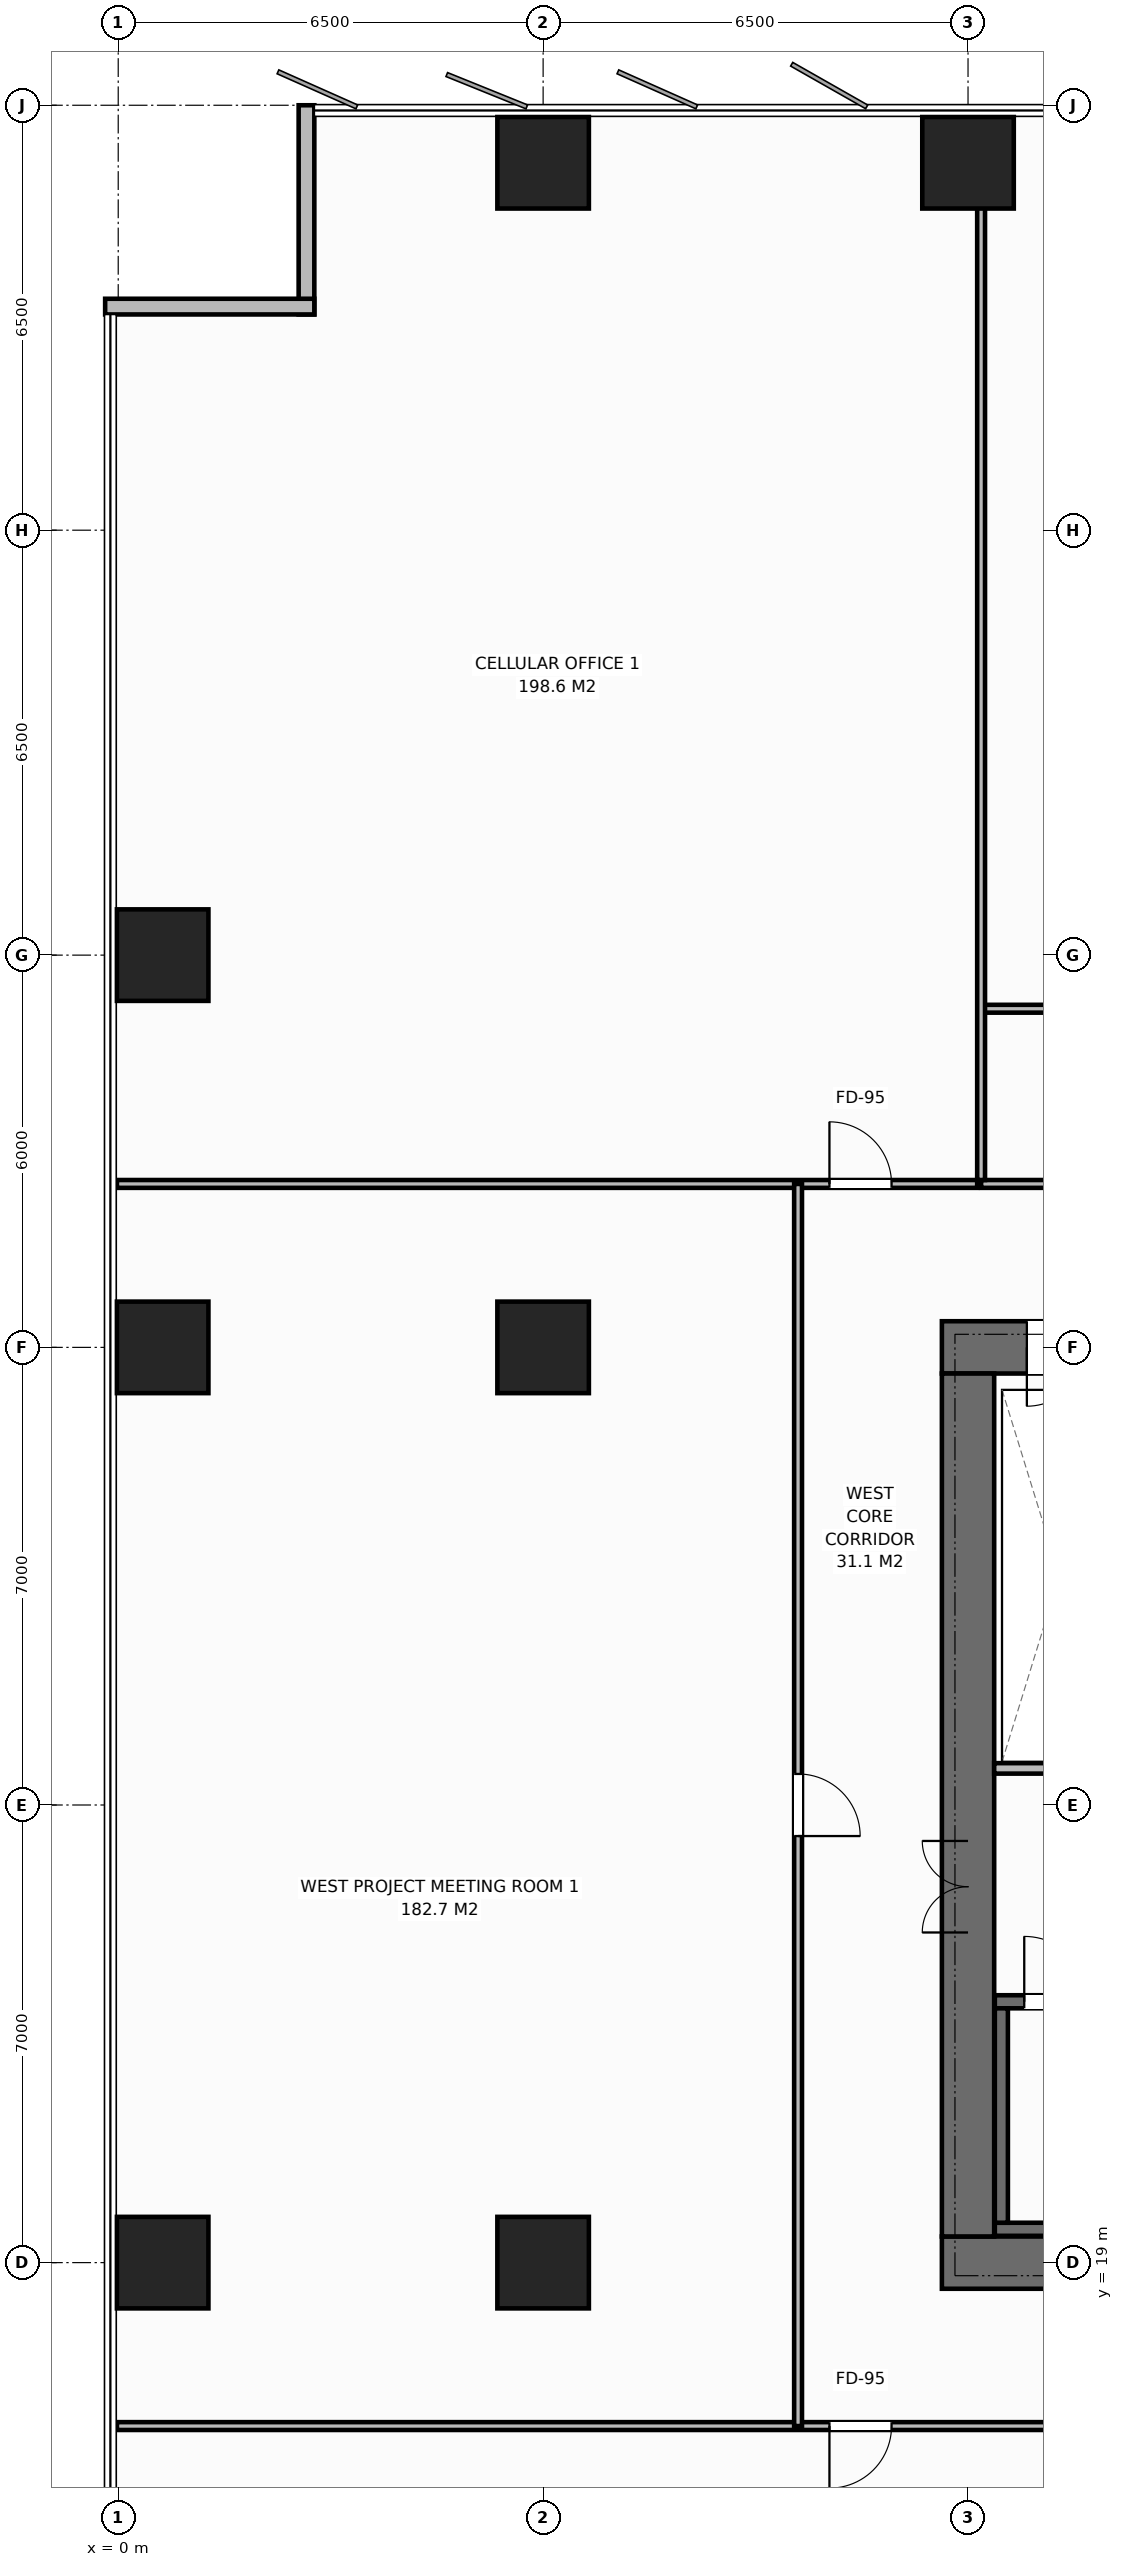
"""IFC4 building model, lengths in metres.
Left out: names, types, materials, properties, quantities, classifications, styles, units other than length and angle.
Written with IfcOpenShell. Run it as: python <this file> out.ifc"""

import sys

from ifc_helpers import new_model, si_unit, direction, frame, frame_2d, origin, origin_2d, place, context, subcontext, project, spatial, rectangle, extrude, element, fill, save


model = new_model("IFC4")
c1 = context("Model", 3, precision=1e-05, world=origin(), true_north=direction((0.0, 1.0)))
c2 = subcontext(c1, "Body", "Model", "MODEL_VIEW")
j1 = project(units=[si_unit("LENGTHUNIT", "METRE"), si_unit("PLANEANGLEUNIT", "RADIAN")], contexts=[c1])
p1 = place(None, origin())
s1 = spatial("IfcSite", under=j1, at=p1, CompositionType="ELEMENT")
p2 = place(p1, origin())
s2 = spatial("IfcBuilding", under=s1, at=p2, CompositionType="ELEMENT")
p3 = place(p2, frame((0.0, 0.0, 27.8)))
s3 = spatial("IfcBuildingStorey", under=s2, at=p3, CompositionType="ELEMENT", Elevation=27.8)
p4 = place(p3, frame((12.6, 19.0, 0.0), z_axis=(0.0, 0.0, 1.0), x_axis=(1.0, 0.0, 0.0)))
e1 = element("IfcWall", 1, at=p4, inside=s3, PredefinedType="SHEAR", context=c2, shape_type="SweptSolid", body=[
    extrude(rectangle(XDim=13.8, YDim=0.8, at=frame_2d((6.9, 0.0))), origin(), (0.0, 0.0, 1.0), 3.8),
])
p5 = place(p4, frame((9.28, 0.0, 0.0)))
e2 = element("IfcOpeningElement", 2, at=p5, cuts=e1, PredefinedType="OPENING", context=c2, shape_type="SweptSolid", body=[
    extrude(rectangle(XDim=1.4, YDim=2.2, at=frame_2d((0.7, 1.1))), frame((0.0, 0.41, 0.0), z_axis=(0.0, -1.0, 0.0), x_axis=(1.0, 0.0, 0.0)), (0.0, 0.0, 1.0), 0.82),
])
p6 = place(p3, frame((12.6, 33.0, 0.0), z_axis=(0.0, 0.0, 1.0), x_axis=(1.0, 0.0, 0.0)))
e3 = element("IfcWall", 3, at=p6, inside=s3, PredefinedType="SHEAR", context=c2, shape_type="SweptSolid", body=[
    extrude(rectangle(XDim=13.8, YDim=0.8, at=frame_2d((6.9, 0.0))), origin(), (0.0, 0.0, 1.0), 3.8),
])
p7 = place(p6, frame((1.3, 0.0, 0.0)))
e4 = element("IfcOpeningElement", 4, at=p7, cuts=e3, PredefinedType="OPENING", context=c2, shape_type="SweptSolid", body=[
    extrude(rectangle(XDim=0.9, YDim=2.15, at=frame_2d((0.45, 1.075))), frame((0.0, 0.41, 0.0), z_axis=(0.0, -1.0, 0.0), x_axis=(1.0, 0.0, 0.0)), (0.0, 0.0, 1.0), 0.82),
])
p8 = place(p6, frame((3.35, 0.0, 0.0)))
e5 = element("IfcOpeningElement", 5, at=p8, cuts=e3, PredefinedType="OPENING", context=c2, shape_type="SweptSolid", body=[
    extrude(rectangle(XDim=0.95, YDim=2.15, at=frame_2d((0.475, 1.075))), frame((0.0, 0.41, 0.0), z_axis=(0.0, -1.0, 0.0), x_axis=(1.0, 0.0, 0.0)), (0.0, 0.0, 1.0), 0.82),
])
p9 = place(p6, frame((6.2, 0.0, 0.0)))
e6 = element("IfcOpeningElement", 6, at=p9, cuts=e3, PredefinedType="OPENING", context=c2, shape_type="SweptSolid", body=[
    extrude(rectangle(XDim=0.95, YDim=2.15, at=frame_2d((0.475, 1.075))), frame((0.0, 0.41, 0.0), z_axis=(0.0, -1.0, 0.0), x_axis=(1.0, 0.0, 0.0)), (0.0, 0.0, 1.0), 0.82),
])
p10 = place(p6, frame((9.28, 0.0, 0.0)))
e7 = element("IfcOpeningElement", 7, at=p10, cuts=e3, PredefinedType="OPENING", context=c2, shape_type="SweptSolid", body=[
    extrude(rectangle(XDim=1.4, YDim=2.2, at=frame_2d((0.7, 1.1))), frame((0.0, 0.41, 0.0), z_axis=(0.0, -1.0, 0.0), x_axis=(1.0, 0.0, 0.0)), (0.0, 0.0, 1.0), 0.82),
])
p11 = place(p3, frame((13.0, 19.4, 0.0), z_axis=(0.0, 0.0, 1.0), x_axis=(0.0, 1.0, 0.0)))
e8 = element("IfcWall", 8, at=p11, inside=s3, PredefinedType="SHEAR", context=c2, shape_type="SweptSolid", body=[
    extrude(rectangle(XDim=13.2, YDim=0.8, at=frame_2d((6.6, 0.0))), origin(), (0.0, 0.0, 1.0), 3.8),
])
p12 = place(p11, frame((4.65, 0.0, 0.0)))
e9 = element("IfcOpeningElement", 9, at=p12, cuts=e8, PredefinedType="OPENING", context=c2, shape_type="SweptSolid", body=[
    extrude(rectangle(XDim=1.4, YDim=2.2, at=frame_2d((0.7, 1.1))), frame((0.0, 0.41, 0.0), z_axis=(0.0, -1.0, 0.0), x_axis=(1.0, 0.0, 0.0)), (0.0, 0.0, 1.0), 0.82),
])
p13 = place(p3, frame((13.41, 19.51, 0.0), z_axis=(0.0, 0.0, 1.0), x_axis=(1.0, 0.0, 0.0)))
e10 = element("IfcWall", 10, at=p13, inside=s3, PredefinedType="SHEAR", context=c2, shape_type="SweptSolid", body=[
    extrude(rectangle(XDim=8.43, YDim=0.2, at=frame_2d((4.215, 0.0))), origin(), (0.0, 0.0, 1.0), 3.8),
])
p14 = place(p3, frame((13.41, 22.99, 0.0), z_axis=(0.0, 0.0, 1.0), x_axis=(1.0, 0.0, 0.0)))
e11 = element("IfcWall", 11, at=p14, inside=s3, PredefinedType="SHEAR", context=c2, shape_type="SweptSolid", body=[
    extrude(rectangle(XDim=8.43, YDim=0.2, at=frame_2d((4.215, 0.0))), origin(), (0.0, 0.0, 1.0), 3.8),
])
p15 = place(p14, frame((0.45, 0.0, 0.0)))
e12 = element("IfcOpeningElement", 12, at=p15, cuts=e11, PredefinedType="OPENING", context=c2, shape_type="SweptSolid", body=[
    extrude(rectangle(XDim=1.0, YDim=2.15, at=frame_2d((0.5, 1.075))), frame((0.0, 0.11, 0.0), z_axis=(0.0, -1.0, 0.0), x_axis=(1.0, 0.0, 0.0)), (0.0, 0.0, 1.0), 0.22),
])
p16 = place(p3, frame((13.51, 19.61, 0.0), z_axis=(0.0, 0.0, 1.0), x_axis=(0.0, 1.0, 0.0)))
e13 = element("IfcWall", 13, at=p16, inside=s3, PredefinedType="SHEAR", context=c2, shape_type="SweptSolid", body=[
    extrude(rectangle(XDim=3.28, YDim=0.2, at=frame_2d((1.64, 0.0))), origin(), (0.0, 0.0, 1.0), 3.8),
])
for number, where, z_axis, x_axis in (
    (14, (6.5, 19.0, 0.0), (0.0, 0.0, 1.0), (1.0, 0.0, 0.0)),
    (15, (6.5, 33.0, 0.0), (0.0, 0.0, 1.0), (1.0, 0.0, 0.0)),
    (16, (6.5, 51.12, 0.0), (0.0, 0.0, 1.0), (1.0, 0.0, 0.0)),
    (17, (13.0, 51.12, 0.0), (0.0, 0.0, 1.0), (1.0, 0.0, 0.0)),
    (18, (0.68, 19.0, 0.0), (0.0, 0.0, 1.0), (1.0, 0.0, 0.0)),
    (19, (0.68, 33.0, 0.0), (0.0, 0.0, 1.0), (1.0, 0.0, 0.0)),
    (20, (0.68, 39.0, 0.0), (0.0, 0.0, 1.0), (1.0, 0.0, 0.0)),
):
    element("IfcColumn", number, at=place(p3, frame(where, z_axis=z_axis, x_axis=x_axis)), inside=s3, PredefinedType="COLUMN", context=c2, shape_type="SweptSolid", body=[
        extrude(rectangle(XDim=1.4, YDim=1.4, at=origin_2d()), origin(), (0.0, 0.0, 1.0), 3.8),
    ])
for number, where, z_axis, x_axis in (
    (21, (2.88, 48.8, 0.0), (0.0, 0.0, 1.0), (0.0, 1.0, 0.0)),
    (22, (-0.2, 48.92, 0.0), (0.0, 0.0, 1.0), (1.0, 0.0, 0.0)),
):
    element("IfcWall", number, at=place(p3, frame(where, z_axis=z_axis, x_axis=x_axis)), inside=s3, PredefinedType="STANDARD", context=c2, shape_type="SweptSolid", body=[
        extrude(rectangle(XDim=3.2, YDim=0.24, at=frame_2d((1.6, 0.0))), origin(), (0.0, 0.0, 1.0), 3.55),
    ])
p17 = place(p3, frame((13.4, 26.56, 0.0), z_axis=(0.0, 0.0, 1.0), x_axis=(1.0, 0.0, 0.0)))
e23 = element("IfcWall", 23, at=p17, inside=s3, PredefinedType="STANDARD", context=c2, shape_type="SweptSolid", body=[
    extrude(rectangle(XDim=8.34, YDim=0.16, at=frame_2d((4.17, 0.0))), origin(), (0.0, 0.0, 1.0), 3.55),
])
p18 = place(p3, frame((13.2, 35.5, 0.0), z_axis=(0.0, 0.0, 1.0), x_axis=(1.0, 0.0, 0.0)))
e24 = element("IfcWall", 24, at=p18, inside=s3, PredefinedType="PARTITIONING", context=c2, shape_type="SweptSolid", body=[
    extrude(rectangle(XDim=13.16, YDim=0.12, at=frame_2d((6.58, 0.0))), origin(), (0.0, 0.0, 1.0), 3.55),
])
p19 = place(p18, frame((1.35, 0.0, 0.0)))
e25 = element("IfcOpeningElement", 25, at=p19, cuts=e24, PredefinedType="OPENING", context=c2, shape_type="SweptSolid", body=[
    extrude(rectangle(XDim=0.9, YDim=2.15, at=frame_2d((0.45, 1.075))), frame((0.0, 0.07, 0.0), z_axis=(0.0, -1.0, 0.0), x_axis=(1.0, 0.0, 0.0)), (0.0, 0.0, 1.0), 0.14),
])
p20 = place(p18, frame((4.05, 0.0, 0.0)))
e26 = element("IfcOpeningElement", 26, at=p20, cuts=e24, PredefinedType="OPENING", context=c2, shape_type="SweptSolid", body=[
    extrude(rectangle(XDim=0.9, YDim=2.15, at=frame_2d((0.45, 1.075))), frame((0.0, 0.07, 0.0), z_axis=(0.0, -1.0, 0.0), x_axis=(1.0, 0.0, 0.0)), (0.0, 0.0, 1.0), 0.14),
])
p21 = place(p18, frame((8.25, 0.0, 0.0)))
e27 = element("IfcOpeningElement", 27, at=p21, cuts=e24, PredefinedType="OPENING", context=c2, shape_type="SweptSolid", body=[
    extrude(rectangle(XDim=0.9, YDim=2.15, at=frame_2d((0.45, 1.075))), frame((0.0, 0.07, 0.0), z_axis=(0.0, -1.0, 0.0), x_axis=(1.0, 0.0, 0.0)), (0.0, 0.0, 1.0), 0.14),
])
p22 = place(p18, frame((11.0, 0.0, 0.0)))
e28 = element("IfcOpeningElement", 28, at=p22, cuts=e24, PredefinedType="OPENING", context=c2, shape_type="SweptSolid", body=[
    extrude(rectangle(XDim=0.95, YDim=2.15, at=frame_2d((0.475, 1.075))), frame((0.0, 0.07, 0.0), z_axis=(0.0, -1.0, 0.0), x_axis=(1.0, 0.0, 0.0)), (0.0, 0.0, 1.0), 0.14),
])
p23 = place(p3, frame((13.2, 38.18, 0.0), z_axis=(0.0, 0.0, 1.0), x_axis=(1.0, 0.0, 0.0)))
e29 = element("IfcWall", 29, at=p23, inside=s3, PredefinedType="PARTITIONING", context=c2, shape_type="SweptSolid", body=[
    extrude(rectangle(XDim=13.16, YDim=0.12, at=frame_2d((6.58, 0.0))), origin(), (0.0, 0.0, 1.0), 3.55),
])
p24 = place(p3, frame((13.2, 35.56, 0.0), z_axis=(0.0, 0.0, 1.0), x_axis=(0.0, 1.0, 0.0)))
e30 = element("IfcWall", 30, at=p24, inside=s3, PredefinedType="PARTITIONING", context=c2, shape_type="SweptSolid", body=[
    extrude(rectangle(XDim=16.42, YDim=0.12, at=frame_2d((8.21, 0.0))), origin(), (0.0, 0.0, 1.0), 2.9),
])
p25 = place(p3, frame((-0.02, 35.5, 0.0), z_axis=(0.0, 0.0, 1.0), x_axis=(1.0, 0.0, 0.0)))
e31 = element("IfcWall", 31, at=p25, inside=s3, PredefinedType="PARTITIONING", context=c2, shape_type="SweptSolid", body=[
    extrude(rectangle(XDim=13.16, YDim=0.12, at=frame_2d((6.58, 0.0))), origin(), (0.0, 0.0, 1.0), 3.55),
])
p26 = place(p25, frame((10.9, 0.0, 0.0)))
e32 = element("IfcOpeningElement", 32, at=p26, cuts=e31, PredefinedType="OPENING", context=c2, shape_type="SweptSolid", body=[
    extrude(rectangle(XDim=0.95, YDim=2.15, at=frame_2d((0.475, 1.075))), frame((0.0, 0.07, 0.0), z_axis=(0.0, -1.0, 0.0), x_axis=(1.0, 0.0, 0.0)), (0.0, 0.0, 1.0), 0.14),
])
p27 = place(p3, frame((-0.02, 16.5, 0.0), z_axis=(0.0, 0.0, 1.0), x_axis=(1.0, 0.0, 0.0)))
e33 = element("IfcWall", 33, at=p27, inside=s3, PredefinedType="PARTITIONING", context=c2, shape_type="SweptSolid", body=[
    extrude(rectangle(XDim=39.943, YDim=0.12, at=frame_2d((19.972, 0.0))), origin(), (0.0, 0.0, 1.0), 3.55),
])
p28 = place(p27, frame((10.9, 0.0, 0.0)))
e34 = element("IfcOpeningElement", 34, at=p28, cuts=e33, PredefinedType="OPENING", context=c2, shape_type="SweptSolid", body=[
    extrude(rectangle(XDim=0.95, YDim=2.15, at=frame_2d((0.475, 1.075))), frame((0.0, 0.07, 0.0), z_axis=(0.0, -1.0, 0.0), x_axis=(1.0, 0.0, 0.0)), (0.0, 0.0, 1.0), 0.14),
])
p29 = place(p3, frame((10.4, 16.5, 0.0), z_axis=(0.0, 0.0, 1.0), x_axis=(0.0, 1.0, 0.0)))
e35 = element("IfcWall", 35, at=p29, inside=s3, PredefinedType="PARTITIONING", context=c2, shape_type="SweptSolid", body=[
    extrude(rectangle(XDim=19.0, YDim=0.12, at=frame_2d((9.5, 0.0))), origin(), (0.0, 0.0, 1.0), 3.55),
])
p30 = place(p29, frame((9.025, 0.0, 0.0)))
e36 = element("IfcOpeningElement", 36, at=p30, cuts=e35, PredefinedType="OPENING", context=c2, shape_type="SweptSolid", body=[
    extrude(rectangle(XDim=0.95, YDim=2.15, at=frame_2d((0.475, 1.075))), frame((0.0, 0.07, 0.0), z_axis=(0.0, -1.0, 0.0), x_axis=(1.0, 0.0, 0.0)), (0.0, 0.0, 1.0), 0.14),
])
p31 = place(p15, origin())
e37 = element("IfcDoor", 37, at=p31, inside=s3, OperationType="SINGLE_SWING_LEFT", PredefinedType="DOOR", context=c2, shape_type="SweptSolid", body=[
    extrude(rectangle(XDim=1.0, YDim=2.15, at=frame_2d((0.5, 1.075))), frame((0.0, 0.025, 0.0), z_axis=(0.0, -1.0, 0.0), x_axis=(1.0, 0.0, 0.0)), (0.0, 0.0, 1.0), 0.05),
])
fill(e12, e37)
p32 = place(p12, origin())
e38 = element("IfcDoor", 38, at=p32, inside=s3, OperationType="DOUBLE_DOOR_SINGLE_SWING", PredefinedType="DOOR", context=c2, shape_type="SweptSolid", body=[
    extrude(rectangle(XDim=1.4, YDim=2.2, at=frame_2d((0.7, 1.1))), frame((0.0, 0.025, 0.0), z_axis=(0.0, -1.0, 0.0), x_axis=(1.0, 0.0, 0.0)), (0.0, 0.0, 1.0), 0.05),
])
fill(e9, e38)
p33 = place(p7, origin())
e39 = element("IfcDoor", 39, at=p33, inside=s3, OperationType="SINGLE_SWING_RIGHT", PredefinedType="DOOR", context=c2, shape_type="SweptSolid", body=[
    extrude(rectangle(XDim=0.9, YDim=2.15, at=frame_2d((0.45, 1.075))), frame((0.0, -0.075, 0.0), z_axis=(0.0, -1.0, 0.0), x_axis=(1.0, 0.0, 0.0)), (0.0, 0.0, 1.0), 0.05),
])
fill(e4, e39)
p34 = place(p26, origin())
e40 = element("IfcDoor", 40, at=p34, inside=s3, OperationType="SINGLE_SWING_LEFT", PredefinedType="DOOR", context=c2, shape_type="SweptSolid", body=[
    extrude(rectangle(XDim=0.95, YDim=2.15, at=frame_2d((0.475, 1.075))), frame((0.0, 0.025, 0.0), z_axis=(0.0, -1.0, 0.0), x_axis=(1.0, 0.0, 0.0)), (0.0, 0.0, 1.0), 0.05),
])
fill(e32, e40)
p35 = place(p28, origin())
e41 = element("IfcDoor", 41, at=p35, inside=s3, OperationType="SINGLE_SWING_RIGHT", PredefinedType="DOOR", context=c2, shape_type="SweptSolid", body=[
    extrude(rectangle(XDim=0.95, YDim=2.15, at=frame_2d((0.475, 1.075))), frame((0.0, 0.025, 0.0), z_axis=(0.0, -1.0, 0.0), x_axis=(1.0, 0.0, 0.0)), (0.0, 0.0, 1.0), 0.05),
])
fill(e34, e41)
p36 = place(p30, origin())
e42 = element("IfcDoor", 42, at=p36, inside=s3, OperationType="SINGLE_SWING_RIGHT", PredefinedType="DOOR", context=c2, shape_type="SweptSolid", body=[
    extrude(rectangle(XDim=0.95, YDim=2.15, at=frame_2d((0.475, 1.075))), frame((0.0, 0.025, 0.0), z_axis=(0.0, -1.0, 0.0), x_axis=(1.0, 0.0, 0.0)), (0.0, 0.0, 1.0), 0.05),
])
fill(e36, e42)
save(model, sys.argv[1])
